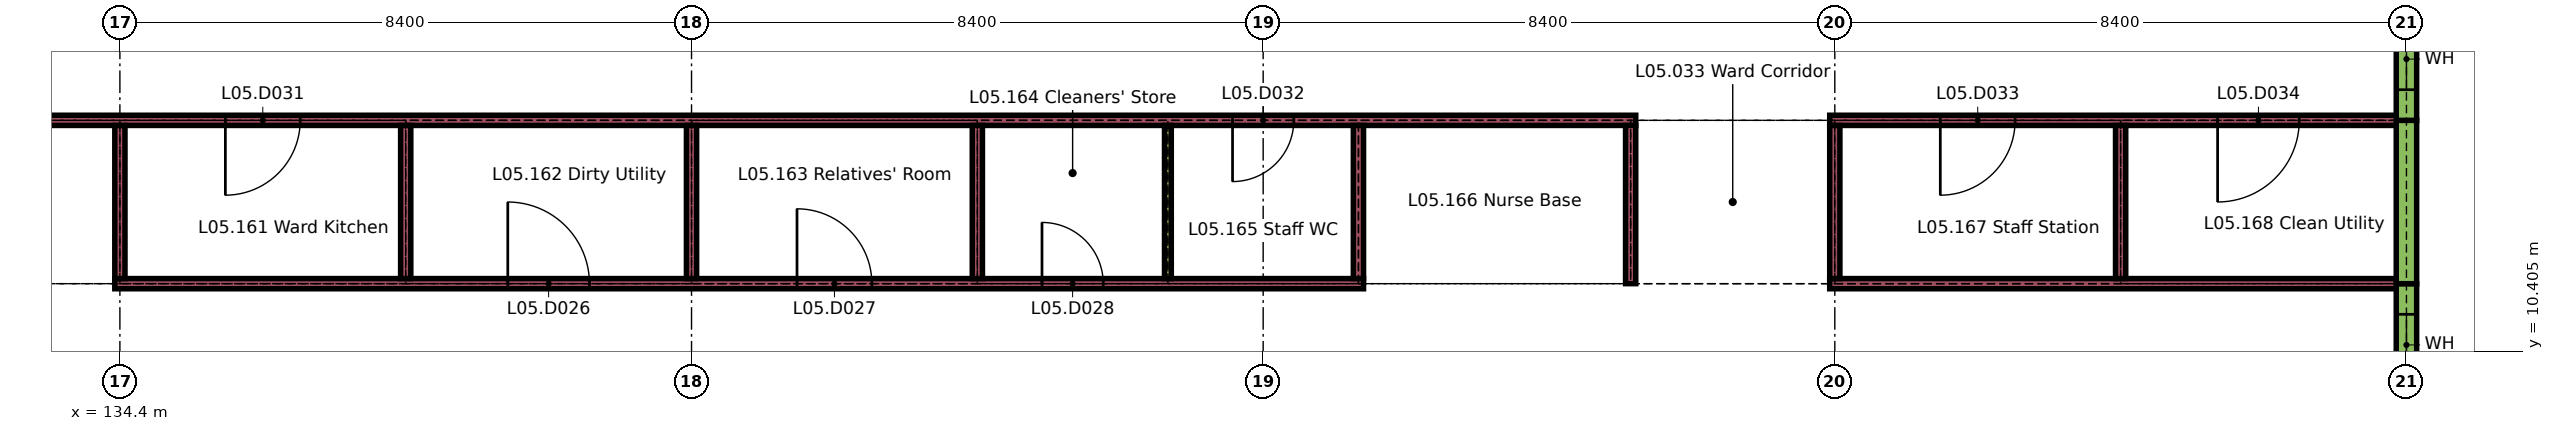
"""IFC4 building model, lengths in metres.
Left out: names, types, materials, properties, quantities, classifications, styles, units other than length and angle.
Written with IfcOpenShell. Run it as: python <this file> out.ifc"""

import sys

from ifc_helpers import new_model, si_unit, direction, frame, frame_2d, origin, place, context, subcontext, project, spatial, rectangle, extrude, element, fill, save


model = new_model("IFC4")
c1 = context("Model", 3, precision=1e-05, world=origin(), true_north=direction((0.0, 1.0)))
c2 = subcontext(c1, "Body", "Model", "MODEL_VIEW")
j1 = project(units=[si_unit("LENGTHUNIT", "METRE"), si_unit("PLANEANGLEUNIT", "RADIAN")], contexts=[c1])
p1 = place(None, origin())
s1 = spatial("IfcSite", under=j1, at=p1, CompositionType="ELEMENT")
p2 = place(p1, origin())
s2 = spatial("IfcBuilding", under=s1, at=p2, CompositionType="ELEMENT")
p3 = place(p2, frame((0.0, 0.0, 22.5)))
s3 = spatial("IfcBuildingStorey", under=s2, at=p3, CompositionType="ELEMENT", Elevation=22.5)
p4 = place(p3, frame((168.0, 8.75, 0.0), z_axis=(0.0, 0.0, 1.0), x_axis=(0.0, 1.0, 0.0)))
e1 = element("IfcWall", 1, at=p4, inside=s3, PredefinedType="SOLIDWALL", context=c2, shape_type="SweptSolid", body=[
    extrude(rectangle(XDim=2.65, YDim=0.3, at=frame_2d((1.325, 0.0))), origin(), (0.0, 0.0, 1.0), 2.96),
])
p5 = place(p4, frame((1.3, 0.0, 0.9)))
e2 = element("IfcOpeningElement", 2, at=p5, cuts=e1, PredefinedType="OPENING", context=c2, shape_type="SweptSolid", body=[
    extrude(rectangle(XDim=0.9, YDim=1.5, at=frame_2d((0.45, 0.75))), frame((0.0, 0.16, 0.0), z_axis=(0.0, -1.0, 0.0), x_axis=(1.0, 0.0, 0.0)), (0.0, 0.0, 1.0), 0.32),
])
p6 = place(p3, frame((168.0, 11.4, 0.0), z_axis=(0.0, 0.0, 1.0), x_axis=(0.0, 1.0, 0.0)))
e3 = element("IfcWall", 3, at=p6, inside=s3, PredefinedType="SOLIDWALL", context=c2, shape_type="SweptSolid", body=[
    extrude(rectangle(XDim=2.4, YDim=0.3, at=frame_2d((1.2, 0.0))), origin(), (0.0, 0.0, 1.0), 2.96),
])
p7 = place(p3, frame((168.0, 13.8, 0.0), z_axis=(0.0, 0.0, 1.0), x_axis=(0.0, 1.0, 0.0)))
e4 = element("IfcWall", 4, at=p7, inside=s3, PredefinedType="SOLIDWALL", context=c2, shape_type="SweptSolid", body=[
    extrude(rectangle(XDim=3.0, YDim=0.3, at=frame_2d((1.5, 0.0))), origin(), (0.0, 0.0, 1.0), 2.96),
])
p8 = place(p7, frame((0.45, 0.0, 0.9)))
e5 = element("IfcOpeningElement", 5, at=p8, cuts=e4, PredefinedType="OPENING", context=c2, shape_type="SweptSolid", body=[
    extrude(rectangle(XDim=0.9, YDim=1.5, at=frame_2d((0.45, 0.75))), frame((0.0, 0.16, 0.0), z_axis=(0.0, -1.0, 0.0), x_axis=(1.0, 0.0, 0.0)), (0.0, 0.0, 1.0), 0.32),
])
p9 = place(p3, frame((134.325, 11.4, 0.0), z_axis=(0.0, 0.0, 1.0), x_axis=(1.0, 0.0, 0.0)))
e6 = element("IfcWall", 6, at=p9, inside=s3, PredefinedType="PARTITIONING", context=c2, shape_type="SweptSolid", body=[
    extrude(rectangle(XDim=18.35, YDim=0.15, at=frame_2d((9.175, 0.0))), origin(), (0.0, 0.0, 1.0), 3.26),
])
p10 = place(p9, frame((5.775, 0.0, 0.0)))
e7 = element("IfcOpeningElement", 7, at=p10, cuts=e6, PredefinedType="OPENING", context=c2, shape_type="SweptSolid", body=[
    extrude(rectangle(XDim=1.2, YDim=2.1, at=frame_2d((0.6, 1.05))), frame((0.0, 0.085, 0.0), z_axis=(0.0, -1.0, 0.0), x_axis=(1.0, 0.0, 0.0)), (0.0, 0.0, 1.0), 0.17),
])
p11 = place(p9, frame((10.025, 0.0, 0.0)))
e8 = element("IfcOpeningElement", 8, at=p11, cuts=e6, PredefinedType="OPENING", context=c2, shape_type="SweptSolid", body=[
    extrude(rectangle(XDim=1.1, YDim=2.1, at=frame_2d((0.55, 1.05))), frame((0.0, 0.085, 0.0), z_axis=(0.0, -1.0, 0.0), x_axis=(1.0, 0.0, 0.0)), (0.0, 0.0, 1.0), 0.17),
])
p12 = place(p9, frame((13.625, 0.0, 0.0)))
e9 = element("IfcOpeningElement", 9, at=p12, cuts=e6, PredefinedType="OPENING", context=c2, shape_type="SweptSolid", body=[
    extrude(rectangle(XDim=0.9, YDim=2.1, at=frame_2d((0.45, 1.05))), frame((0.0, 0.085, 0.0), z_axis=(0.0, -1.0, 0.0), x_axis=(1.0, 0.0, 0.0)), (0.0, 0.0, 1.0), 0.17),
])
p13 = place(p3, frame((159.525, 11.4, 0.0), z_axis=(0.0, 0.0, 1.0), x_axis=(1.0, 0.0, 0.0)))
e10 = element("IfcWall", 10, at=p13, inside=s3, PredefinedType="PARTITIONING", context=c2, shape_type="SweptSolid", body=[
    extrude(rectangle(XDim=8.325, YDim=0.15, at=frame_2d((4.163, 0.0))), origin(), (0.0, 0.0, 1.0), 3.26),
])
p14 = place(p3, frame((126.1, 13.8, 0.0), z_axis=(0.0, 0.0, 1.0), x_axis=(1.0, 0.0, 0.0)))
e11 = element("IfcWall", 11, at=p14, inside=s3, PredefinedType="PARTITIONING", context=c2, shape_type="SweptSolid", body=[
    extrude(rectangle(XDim=30.575, YDim=0.15, at=frame_2d((15.288, 0.0))), origin(), (0.0, 0.0, 1.0), 3.26),
])
p15 = place(p14, frame((9.85, 0.0, 0.0)))
e12 = element("IfcOpeningElement", 12, at=p15, cuts=e11, PredefinedType="OPENING", context=c2, shape_type="SweptSolid", body=[
    extrude(rectangle(XDim=1.1, YDim=2.1, at=frame_2d((0.55, 1.05))), frame((0.0, 0.085, 0.0), z_axis=(0.0, -1.0, 0.0), x_axis=(1.0, 0.0, 0.0)), (0.0, 0.0, 1.0), 0.17),
])
p16 = place(p14, frame((24.65, 0.0, 0.0)))
e13 = element("IfcOpeningElement", 13, at=p16, cuts=e11, PredefinedType="OPENING", context=c2, shape_type="SweptSolid", body=[
    extrude(rectangle(XDim=0.9, YDim=2.1, at=frame_2d((0.45, 1.05))), frame((0.0, 0.085, 0.0), z_axis=(0.0, -1.0, 0.0), x_axis=(1.0, 0.0, 0.0)), (0.0, 0.0, 1.0), 0.17),
])
p17 = place(p3, frame((159.525, 13.8, 0.0), z_axis=(0.0, 0.0, 1.0), x_axis=(1.0, 0.0, 0.0)))
e14 = element("IfcWall", 14, at=p17, inside=s3, PredefinedType="PARTITIONING", context=c2, shape_type="SweptSolid", body=[
    extrude(rectangle(XDim=8.325, YDim=0.15, at=frame_2d((4.163, 0.0))), origin(), (0.0, 0.0, 1.0), 3.26),
])
p18 = place(p17, frame((1.625, 0.0, 0.0)))
e15 = element("IfcOpeningElement", 15, at=p18, cuts=e14, PredefinedType="OPENING", context=c2, shape_type="SweptSolid", body=[
    extrude(rectangle(XDim=1.1, YDim=2.1, at=frame_2d((0.55, 1.05))), frame((0.0, 0.085, 0.0), z_axis=(0.0, -1.0, 0.0), x_axis=(1.0, 0.0, 0.0)), (0.0, 0.0, 1.0), 0.17),
])
p19 = place(p17, frame((5.7, 0.0, 0.0)))
e16 = element("IfcOpeningElement", 16, at=p19, cuts=e14, PredefinedType="OPENING", context=c2, shape_type="SweptSolid", body=[
    extrude(rectangle(XDim=1.2, YDim=2.1, at=frame_2d((0.6, 1.05))), frame((0.0, 0.085, 0.0), z_axis=(0.0, -1.0, 0.0), x_axis=(1.0, 0.0, 0.0)), (0.0, 0.0, 1.0), 0.17),
])
for number, where, z_axis, x_axis in (
    (17, (134.4, 11.475, 0.0), (0.0, 0.0, 1.0), (0.0, 1.0, 0.0)),
    (18, (138.6, 11.475, 0.0), (0.0, 0.0, 1.0), (0.0, 1.0, 0.0)),
    (19, (142.8, 11.475, 0.0), (0.0, 0.0, 1.0), (0.0, 1.0, 0.0)),
    (20, (147.0, 11.475, 0.0), (0.0, 0.0, 1.0), (0.0, 1.0, 0.0)),
):
    element("IfcWall", number, at=place(p3, frame(where, z_axis=z_axis, x_axis=x_axis)), inside=s3, PredefinedType="PARTITIONING", context=c2, shape_type="SweptSolid", body=[
        extrude(rectangle(XDim=2.25, YDim=0.15, at=frame_2d((1.125, 0.0))), origin(), (0.0, 0.0, 1.0), 3.26),
    ])
p20 = place(p3, frame((149.8, 11.475, 0.0), z_axis=(0.0, 0.0, 1.0), x_axis=(0.0, 1.0, 0.0)))
e21 = element("IfcWall", 21, at=p20, inside=s3, PredefinedType="PARTITIONING", context=c2, shape_type="SweptSolid", body=[
    extrude(rectangle(XDim=2.25, YDim=0.1, at=frame_2d((1.125, 0.0))), origin(), (0.0, 0.0, 1.0), 3.26),
])
p21 = place(p3, frame((152.6, 11.475, 0.0), z_axis=(0.0, 0.0, 1.0), x_axis=(0.0, 1.0, 0.0)))
e22 = element("IfcWall", 22, at=p21, inside=s3, PredefinedType="PARTITIONING", context=c2, shape_type="SweptSolid", body=[
    extrude(rectangle(XDim=2.25, YDim=0.15, at=frame_2d((1.125, 0.0))), origin(), (0.0, 0.0, 1.0), 3.26),
])
p22 = place(p3, frame((156.6, 11.4, 0.0), z_axis=(0.0, 0.0, 1.0), x_axis=(0.0, 1.0, 0.0)))
e23 = element("IfcWall", 23, at=p22, inside=s3, PredefinedType="PARTITIONING", context=c2, shape_type="SweptSolid", body=[
    extrude(rectangle(XDim=2.325, YDim=0.15, at=frame_2d((1.163, 0.0))), origin(), (0.0, 0.0, 1.0), 3.26),
])
for number, where, z_axis, x_axis in (
    (24, (159.6, 11.475, 0.0), (0.0, 0.0, 1.0), (0.0, 1.0, 0.0)),
    (25, (163.8, 11.475, 0.0), (0.0, 0.0, 1.0), (0.0, 1.0, 0.0)),
):
    element("IfcWall", number, at=place(p3, frame(where, z_axis=z_axis, x_axis=x_axis)), inside=s3, PredefinedType="PARTITIONING", context=c2, shape_type="SweptSolid", body=[
        extrude(rectangle(XDim=2.25, YDim=0.15, at=frame_2d((1.125, 0.0))), origin(), (0.0, 0.0, 1.0), 3.26),
    ])
p23 = place(p5, origin())
e26 = element("IfcWindow", 26, at=p23, inside=s3, PartitioningType="SINGLE_PANEL", PredefinedType="WINDOW", context=c2, shape_type="SweptSolid", body=[
    extrude(rectangle(XDim=0.9, YDim=1.5, at=frame_2d((0.45, 0.75))), frame((0.0, 0.03, 0.0), z_axis=(0.0, -1.0, 0.0), x_axis=(1.0, 0.0, 0.0)), (0.0, 0.0, 1.0), 0.06),
])
fill(e2, e26)
p24 = place(p8, origin())
e27 = element("IfcWindow", 27, at=p24, inside=s3, PartitioningType="SINGLE_PANEL", PredefinedType="WINDOW", context=c2, shape_type="SweptSolid", body=[
    extrude(rectangle(XDim=0.9, YDim=1.5, at=frame_2d((0.45, 0.75))), frame((0.0, 0.03, 0.0), z_axis=(0.0, -1.0, 0.0), x_axis=(1.0, 0.0, 0.0)), (0.0, 0.0, 1.0), 0.06),
])
fill(e5, e27)
p25 = place(p10, origin())
e28 = element("IfcDoor", 28, at=p25, inside=s3, OperationType="SINGLE_SWING_RIGHT", PredefinedType="DOOR", context=c2, shape_type="SweptSolid", body=[
    extrude(rectangle(XDim=1.2, YDim=2.1, at=frame_2d((0.6, 1.05))), frame((0.0, 0.025, 0.0), z_axis=(0.0, -1.0, 0.0), x_axis=(1.0, 0.0, 0.0)), (0.0, 0.0, 1.0), 0.05),
])
fill(e7, e28)
p26 = place(p11, origin())
e29 = element("IfcDoor", 29, at=p26, inside=s3, OperationType="SINGLE_SWING_RIGHT", PredefinedType="DOOR", context=c2, shape_type="SweptSolid", body=[
    extrude(rectangle(XDim=1.1, YDim=2.1, at=frame_2d((0.55, 1.05))), frame((0.0, 0.025, 0.0), z_axis=(0.0, -1.0, 0.0), x_axis=(1.0, 0.0, 0.0)), (0.0, 0.0, 1.0), 0.05),
])
fill(e8, e29)
p27 = place(p12, origin())
e30 = element("IfcDoor", 30, at=p27, inside=s3, OperationType="SINGLE_SWING_RIGHT", PredefinedType="DOOR", context=c2, shape_type="SweptSolid", body=[
    extrude(rectangle(XDim=0.9, YDim=2.1, at=frame_2d((0.45, 1.05))), frame((0.0, 0.02, 0.0), z_axis=(0.0, -1.0, 0.0), x_axis=(1.0, 0.0, 0.0)), (0.0, 0.0, 1.0), 0.04),
])
fill(e9, e30)
p28 = place(p15, origin())
e31 = element("IfcDoor", 31, at=p28, inside=s3, OperationType="SINGLE_SWING_LEFT", PredefinedType="DOOR", context=c2, shape_type="SweptSolid", body=[
    extrude(rectangle(XDim=1.1, YDim=2.1, at=frame_2d((0.55, 1.05))), frame((0.0, 0.025, 0.0), z_axis=(0.0, -1.0, 0.0), x_axis=(1.0, 0.0, 0.0)), (0.0, 0.0, 1.0), 0.05),
])
fill(e12, e31)
p29 = place(p16, origin())
e32 = element("IfcDoor", 32, at=p29, inside=s3, OperationType="SINGLE_SWING_LEFT", PredefinedType="DOOR", context=c2, shape_type="SweptSolid", body=[
    extrude(rectangle(XDim=0.9, YDim=2.1, at=frame_2d((0.45, 1.05))), frame((0.0, 0.02, 0.0), z_axis=(0.0, -1.0, 0.0), x_axis=(1.0, 0.0, 0.0)), (0.0, 0.0, 1.0), 0.04),
])
fill(e13, e32)
p30 = place(p18, origin())
e33 = element("IfcDoor", 33, at=p30, inside=s3, OperationType="SINGLE_SWING_LEFT", PredefinedType="DOOR", context=c2, shape_type="SweptSolid", body=[
    extrude(rectangle(XDim=1.1, YDim=2.1, at=frame_2d((0.55, 1.05))), frame((0.0, 0.025, 0.0), z_axis=(0.0, -1.0, 0.0), x_axis=(1.0, 0.0, 0.0)), (0.0, 0.0, 1.0), 0.05),
])
fill(e15, e33)
p31 = place(p19, origin())
e34 = element("IfcDoor", 34, at=p31, inside=s3, OperationType="SINGLE_SWING_LEFT", PredefinedType="DOOR", context=c2, shape_type="SweptSolid", body=[
    extrude(rectangle(XDim=1.2, YDim=2.1, at=frame_2d((0.6, 1.05))), frame((0.0, 0.025, 0.0), z_axis=(0.0, -1.0, 0.0), x_axis=(1.0, 0.0, 0.0)), (0.0, 0.0, 1.0), 0.05),
])
fill(e16, e34)
save(model, sys.argv[1])
